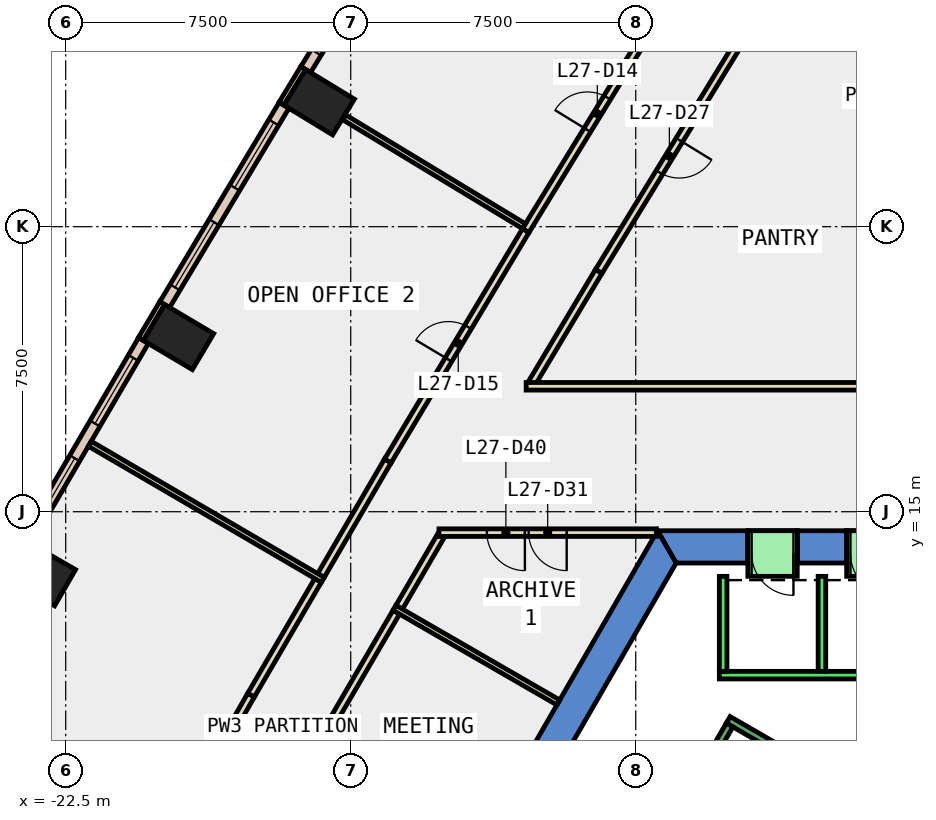
"""IFC4 building model, lengths in metres.
Left out: names, types, materials, properties, quantities, classifications, styles, units other than length and angle.
Written with IfcOpenShell. Run it as: python <this file> out.ifc"""

import sys

from ifc_helpers import new_model, si_unit, direction, frame, frame_2d, origin, origin_2d, place, context, subcontext, project, spatial, polyline, rectangle, outline, extrude, element, fill, save


model = new_model("IFC4")
c1 = context("Model", 3, precision=1e-05, world=origin(), true_north=direction((0.0, 1.0)))
c2 = subcontext(c1, "Body", "Model", "MODEL_VIEW")
j1 = project(units=[si_unit("LENGTHUNIT", "METRE"), si_unit("PLANEANGLEUNIT", "RADIAN")], contexts=[c1])
p1 = place(None, origin())
s1 = spatial("IfcSite", under=j1, at=p1, CompositionType="ELEMENT")
p2 = place(p1, origin())
s2 = spatial("IfcBuilding", under=s1, at=p2, CompositionType="ELEMENT")
p3 = place(p2, frame((0.0, 0.0, 124.4)))
s3 = spatial("IfcBuildingStorey", under=s2, at=p3, CompositionType="ELEMENT", Elevation=124.4)
for number, where, z_axis, x_axis in (
    (1, (-15.831, 25.776, -0.4), (0.0, 0.0, 1.0), (0.52, 0.854, 0.0)),
    (2, (-19.532, 19.595, -0.4), (0.0, 0.0, 1.0), (0.51, 0.86, 0.0)),
    (3, (-23.166, 13.375, -0.4), (0.0, 0.0, 1.0), (0.5, 0.866, 0.0)),
):
    element("IfcColumn", number, at=place(p3, frame(where, z_axis=z_axis, x_axis=x_axis)), inside=s3, PredefinedType="COLUMN", context=c2, shape_type="SweptSolid", body=[
        extrude(rectangle(XDim=1.1, YDim=1.5, at=origin_2d()), origin(), (0.0, 0.0, 1.0), 4.2),
    ])
p4 = place(p3, frame((0.0, 0.0, -0.4)))
e4 = element("IfcWall", 4, at=p4, inside=s3, PredefinedType="SHEAR", context=c2, shape_type="SweptSolid", body=[
    extrude(outline(polyline([(-3.25, 14.5), (-3.25, 13.65), (-1.95, 13.65), (-1.95, 14.5), (-3.25, 14.5)])), origin(), (0.0, 0.0, 1.0), 4.2),
])
p5 = place(p3, frame((0.0, 0.0, -0.4)))
e5 = element("IfcWall", 5, at=p5, inside=s3, PredefinedType="SHEAR", context=c2, shape_type="SweptSolid", body=[
    extrude(outline(polyline([(-4.55, 13.65), (-4.55, 14.5), (-6.928, 14.5), (-6.437, 13.65), (-4.55, 13.65)])), origin(), (0.0, 0.0, 1.0), 4.2),
])
p6 = place(p3, frame((0.0, 0.0, 3.6)))
e6 = element("IfcWall", 6, at=p6, inside=s3, PredefinedType="SHEAR", context=c2, shape_type="SweptSolid", body=[
    extrude(outline(polyline([(-1.95, 14.5), (-1.95, 13.65), (-0.65, 13.65), (-0.65, 14.5), (-1.95, 14.5)])), origin(), (0.0, 0.0, 1.0), 0.2),
])
p7 = place(p3, frame((0.0, 0.0, 3.6)))
e7 = element("IfcWall", 7, at=p7, inside=s3, PredefinedType="SHEAR", context=c2, shape_type="SweptSolid", body=[
    extrude(outline(polyline([(-4.55, 14.5), (-4.55, 13.65), (-3.25, 13.65), (-3.25, 14.5), (-4.55, 14.5)])), origin(), (0.0, 0.0, 1.0), 0.2),
])
p8 = place(p3, frame((0.0, 0.0, -0.4)))
e8 = element("IfcWall", 8, at=p8, inside=s3, PredefinedType="SHEAR", context=c2, shape_type="SweptSolid", body=[
    extrude(outline(polyline([(-12.267, 5.252), (-11.531, 4.827), (-6.437, 13.65), (-6.928, 14.5), (-12.267, 5.252)])), origin(), (0.0, 0.0, 1.0), 4.2),
])
p9 = place(p3, frame((-16.25, 26.675, 0.0), z_axis=(0.0, 0.0, 1.0), x_axis=(-0.519869515594, -0.854245682901, 0.0)))
e9 = element("IfcWall", 9, at=p9, inside=s3, PredefinedType="STANDARD", context=c2, shape_type="SweptSolid", body=[
    extrude(rectangle(XDim=1.1, YDim=0.15, at=frame_2d((0.55, 0.0))), origin(), (0.0, 0.0, 1.0), 3.8),
])
p10 = place(p3, frame((-19.961, 20.489, 0.0), z_axis=(0.0, 0.0, 1.0), x_axis=(-0.510082245696, -0.860125631885, 0.0)))
e10 = element("IfcWall", 10, at=p10, inside=s3, PredefinedType="STANDARD", context=c2, shape_type="SweptSolid", body=[
    extrude(rectangle(XDim=1.1, YDim=0.15, at=frame_2d((0.55, 0.0))), origin(), (0.0, 0.0, 1.0), 3.8),
])
p11 = place(p3, frame((-12.989, 31.846, 0.0), z_axis=(0.0, 0.0, 1.0), x_axis=(-0.522757750181, -0.8524812811, 0.0)))
e11 = element("IfcWall", 11, at=p11, inside=s3, PredefinedType="STANDARD", context=c2, shape_type="SweptSolid", body=[
    extrude(rectangle(XDim=6.114, YDim=0.3, at=frame_2d((3.057, 0.0))), origin(), (0.0, 0.0, 1.0), 3.8),
])
p12 = place(p11, frame((0.528, 0.0, 0.9)))
e12 = element("IfcOpeningElement", 12, at=p12, cuts=e11, PredefinedType="OPENING", context=c2, shape_type="SweptSolid", body=[
    extrude(rectangle(XDim=2.0, YDim=2.6, at=frame_2d((1.0, 1.3))), frame((0.0, 0.16, 0.0), z_axis=(0.0, -1.0, 0.0), x_axis=(1.0, 0.0, 0.0)), (0.0, 0.0, 1.0), 0.32),
])
p13 = place(p11, frame((3.585, 0.0, 0.9)))
e13 = element("IfcOpeningElement", 13, at=p13, cuts=e11, PredefinedType="OPENING", context=c2, shape_type="SweptSolid", body=[
    extrude(rectangle(XDim=2.0, YDim=2.6, at=frame_2d((1.0, 1.3))), frame((0.0, 0.16, 0.0), z_axis=(0.0, -1.0, 0.0), x_axis=(1.0, 0.0, 0.0)), (0.0, 0.0, 1.0), 0.32),
])
p14 = place(p3, frame((-16.754, 25.695, 0.0), z_axis=(0.0, 0.0, 1.0), x_axis=(-0.513708729904, -0.857964650099, 0.0)))
e14 = element("IfcWall", 14, at=p14, inside=s3, PredefinedType="STANDARD", context=c2, shape_type="SweptSolid", body=[
    extrude(rectangle(XDim=6.115, YDim=0.3, at=frame_2d((3.057, 0.0))), origin(), (0.0, 0.0, 1.0), 3.8),
])
p15 = place(p14, frame((0.529, 0.0, 0.9)))
e15 = element("IfcOpeningElement", 15, at=p15, cuts=e14, PredefinedType="OPENING", context=c2, shape_type="SweptSolid", body=[
    extrude(rectangle(XDim=2.0, YDim=2.6, at=frame_2d((1.0, 1.3))), frame((0.0, 0.16, 0.0), z_axis=(0.0, -1.0, 0.0), x_axis=(1.0, 0.0, 0.0)), (0.0, 0.0, 1.0), 0.32),
])
p16 = place(p14, frame((3.586, 0.0, 0.9)))
e16 = element("IfcOpeningElement", 16, at=p16, cuts=e14, PredefinedType="OPENING", context=c2, shape_type="SweptSolid", body=[
    extrude(rectangle(XDim=2.0, YDim=2.6, at=frame_2d((1.0, 1.3))), frame((0.0, 0.16, 0.0), z_axis=(0.0, -1.0, 0.0), x_axis=(1.0, 0.0, 0.0)), (0.0, 0.0, 1.0), 0.32),
])
p17 = place(p3, frame((-20.454, 19.503, 0.0), z_axis=(0.0, 0.0, 1.0), x_axis=(-0.504441987427, -0.863445586775, 0.0)))
e17 = element("IfcWall", 17, at=p17, inside=s3, PredefinedType="STANDARD", context=c2, shape_type="SweptSolid", body=[
    extrude(rectangle(XDim=6.114, YDim=0.3, at=frame_2d((3.057, 0.0))), origin(), (0.0, 0.0, 1.0), 3.8),
])
p18 = place(p17, frame((0.528, 0.0, 0.9)))
e18 = element("IfcOpeningElement", 18, at=p18, cuts=e17, PredefinedType="OPENING", context=c2, shape_type="SweptSolid", body=[
    extrude(rectangle(XDim=2.0, YDim=2.6, at=frame_2d((1.0, 1.3))), frame((0.0, 0.16, 0.0), z_axis=(0.0, -1.0, 0.0), x_axis=(1.0, 0.0, 0.0)), (0.0, 0.0, 1.0), 0.32),
])
p19 = place(p17, frame((3.585, 0.0, 0.9)))
e19 = element("IfcOpeningElement", 19, at=p19, cuts=e17, PredefinedType="OPENING", context=c2, shape_type="SweptSolid", body=[
    extrude(rectangle(XDim=2.0, YDim=2.6, at=frame_2d((1.0, 1.3))), frame((0.0, 0.16, 0.0), z_axis=(0.0, -1.0, 0.0), x_axis=(1.0, 0.0, 0.0)), (0.0, 0.0, 1.0), 0.32),
])
p20 = place(p3, frame((-12.628, 14.364, 0.0), z_axis=(0.0, 0.0, 1.0), x_axis=(-0.504457175129, -0.863436713639, 0.0)))
e20 = element("IfcWall", 20, at=p20, inside=s3, PredefinedType="PARTITIONING", context=c2, shape_type="SweptSolid", body=[
    extrude(rectangle(XDim=2.175, YDim=0.2, at=frame_2d((1.087, 0.0))), origin(), (0.0, 0.0, 1.0), 3.8),
])
p21 = place(p3, frame((-13.801, 12.356, 0.0), z_axis=(0.0, 0.0, 1.0), x_axis=(-0.504282474222, -0.863538757782, 0.0)))
e21 = element("IfcWall", 21, at=p21, inside=s3, PredefinedType="PARTITIONING", context=c2, shape_type="SweptSolid", body=[
    extrude(rectangle(XDim=3.8, YDim=0.2, at=frame_2d((1.9, 0.0))), origin(), (0.0, 0.0, 1.0), 3.8),
])
p22 = place(p3, frame((-15.717, 9.075, 0.0), z_axis=(0.0, 0.0, 1.0), x_axis=(-0.495695496657, -0.868496387208, 0.0)))
e22 = element("IfcWall", 22, at=p22, inside=s3, PredefinedType="PARTITIONING", context=c2, shape_type="SweptSolid", body=[
    extrude(rectangle(XDim=1.186, YDim=0.2, at=frame_2d((0.593, 0.0))), origin(), (0.0, 0.0, 1.0), 3.8),
])
p23 = place(p3, frame((-4.756, 27.386, 0.0), z_axis=(0.0, 0.0, 1.0), x_axis=(-0.522743103274, -0.852490262689, 0.0)))
e23 = element("IfcWall", 23, at=p23, inside=s3, PredefinedType="PARTITIONING", context=c2, shape_type="SweptSolid", body=[
    extrude(rectangle(XDim=7.115, YDim=0.2, at=frame_2d((3.557, 0.0))), origin(), (0.0, 0.0, 1.0), 3.8),
])
p24 = place(p23, frame((3.057, 0.0, 0.0)))
e24 = element("IfcOpeningElement", 24, at=p24, cuts=e23, PredefinedType="OPENING", context=c2, shape_type="SweptSolid", body=[
    extrude(rectangle(XDim=1.0, YDim=2.1, at=frame_2d((0.5, 1.05))), frame((0.0, 0.11, 0.0), z_axis=(0.0, -1.0, 0.0), x_axis=(1.0, 0.0, 0.0)), (0.0, 0.0, 1.0), 0.22),
])
p25 = place(p3, frame((-8.475, 21.321, 0.0), z_axis=(0.0, 0.0, 1.0), x_axis=(-0.513592824646, -0.858034038062, 0.0)))
e25 = element("IfcWall", 25, at=p25, inside=s3, PredefinedType="PARTITIONING", context=c2, shape_type="SweptSolid", body=[
    extrude(rectangle(XDim=3.421, YDim=0.2, at=frame_2d((1.71, 0.0))), origin(), (0.0, 0.0, 1.0), 3.8),
])
p26 = place(p3, frame((-10.396, 22.397, 0.0), z_axis=(0.0, 0.0, 1.0), x_axis=(0.522695398968, 0.852519512913, 0.0)))
e26 = element("IfcWall", 26, at=p26, inside=s3, PredefinedType="PARTITIONING", context=c2, shape_type="SweptSolid", body=[
    extrude(rectangle(XDim=7.213, YDim=0.2, at=frame_2d((3.606, 0.0))), origin(), (0.0, 0.0, 1.0), 3.8),
])
p27 = place(p26, frame((3.106, 0.0, 0.0)))
e27 = element("IfcOpeningElement", 27, at=p27, cuts=e26, PredefinedType="OPENING", context=c2, shape_type="SweptSolid", body=[
    extrude(rectangle(XDim=1.0, YDim=2.1, at=frame_2d((0.5, 1.05))), frame((0.0, 0.11, 0.0), z_axis=(0.0, -1.0, 0.0), x_axis=(1.0, 0.0, 0.0)), (0.0, 0.0, 1.0), 0.22),
])
p28 = place(p3, frame((-15.784, 13.322, 0.0), z_axis=(0.0, 0.0, 1.0), x_axis=(0.50424043703, 0.863563304954, 0.0)))
e28 = element("IfcWall", 28, at=p28, inside=s3, PredefinedType="PARTITIONING", context=c2, shape_type="SweptSolid", body=[
    extrude(rectangle(XDim=3.492, YDim=0.2, at=frame_2d((1.746, 0.0))), origin(), (0.0, 0.0, 1.0), 3.8),
])
p29 = place(p3, frame((-14.023, 16.338, 0.0), z_axis=(0.0, 0.0, 1.0), x_axis=(0.513773581048, 0.857925816966, 0.0)))
e29 = element("IfcWall", 29, at=p29, inside=s3, PredefinedType="PARTITIONING", context=c2, shape_type="SweptSolid", body=[
    extrude(rectangle(XDim=7.061, YDim=0.2, at=frame_2d((3.531, 0.0))), origin(), (0.0, 0.0, 1.0), 3.8),
])
p30 = place(p29, frame((3.106, 0.0, 0.0)))
e30 = element("IfcOpeningElement", 30, at=p30, cuts=e29, PredefinedType="OPENING", context=c2, shape_type="SweptSolid", body=[
    extrude(rectangle(XDim=1.0, YDim=2.1, at=frame_2d((0.5, 1.05))), frame((0.0, 0.11, 0.0), z_axis=(0.0, -1.0, 0.0), x_axis=(1.0, 0.0, 0.0)), (0.0, 0.0, 1.0), 0.22),
])
p31 = place(p3, frame((-21.16, 3.974, 0.0), z_axis=(0.0, 0.0, 1.0), x_axis=(0.495450054309, 0.868636427791, 0.0)))
e31 = element("IfcWall", 31, at=p31, inside=s3, PredefinedType="PARTITIONING", context=c2, shape_type="SweptSolid", body=[
    extrude(rectangle(XDim=7.139, YDim=0.2, at=frame_2d((3.569, 0.0))), origin(), (0.0, 0.0, 1.0), 3.8),
])
p32 = place(p31, frame((3.069, 0.0, 0.0)))
e32 = element("IfcOpeningElement", 32, at=p32, cuts=e31, PredefinedType="OPENING", context=c2, shape_type="SweptSolid", body=[
    extrude(rectangle(XDim=1.0, YDim=2.1, at=frame_2d((0.5, 1.05))), frame((0.0, 0.11, 0.0), z_axis=(0.0, -1.0, 0.0), x_axis=(1.0, 0.0, 0.0)), (0.0, 0.0, 1.0), 0.22),
])
p33 = place(p3, frame((-17.623, 10.175, 0.0), z_axis=(0.0, 0.0, 1.0), x_axis=(0.504383407959, 0.863479807393, 0.0)))
e33 = element("IfcWall", 33, at=p33, inside=s3, PredefinedType="PARTITIONING", context=c2, shape_type="SweptSolid", body=[
    extrude(rectangle(XDim=3.495, YDim=0.2, at=frame_2d((1.748, 0.0))), origin(), (0.0, 0.0, 1.0), 3.8),
])
p34 = place(p3, frame((-9.537, 9.981, 0.0), z_axis=(0.0, 0.0, 1.0), x_axis=(-0.866035377451, 0.499982724704, 0.0)))
e34 = element("IfcWall", 34, at=p34, inside=s3, PredefinedType="PARTITIONING", context=c2, shape_type="SweptSolid", body=[
    extrude(rectangle(XDim=4.98, YDim=0.15, at=frame_2d((2.49, 0.0))), origin(), (0.0, 0.0, 1.0), 3.8),
])
p35 = place(p3, frame((-6.957, 14.45, 0.0), z_axis=(0.0, 0.0, 1.0), x_axis=(-1.0, 0.0, 0.0)))
e35 = element("IfcWall", 35, at=p35, inside=s3, PredefinedType="PARTITIONING", context=c2, shape_type="SweptSolid", body=[
    extrude(rectangle(XDim=5.721, YDim=0.2, at=frame_2d((2.86, 0.0))), origin(), (0.0, 0.0, 1.0), 3.8),
])
p36 = place(p35, frame((2.36, 0.0, 0.0)))
e36 = element("IfcOpeningElement", 36, at=p36, cuts=e35, PredefinedType="OPENING", context=c2, shape_type="SweptSolid", body=[
    extrude(rectangle(XDim=1.0, YDim=2.1, at=frame_2d((0.5, 1.05))), frame((0.0, 0.11, 0.0), z_axis=(0.0, -1.0, 0.0), x_axis=(1.0, 0.0, 0.0)), (0.0, 0.0, 1.0), 0.22),
])
p37 = place(p35, frame((3.46, 0.0, 0.0)))
e37 = element("IfcOpeningElement", 37, at=p37, cuts=e35, PredefinedType="OPENING", context=c2, shape_type="SweptSolid", body=[
    extrude(rectangle(XDim=1.0, YDim=2.1, at=frame_2d((0.5, 1.05))), frame((0.0, 0.11, 0.0), z_axis=(0.0, -1.0, 0.0), x_axis=(1.0, 0.0, 0.0)), (0.0, 0.0, 1.0), 0.22),
])
p38 = place(p3, frame((-10.384, 18.3, 0.0), z_axis=(0.0, 0.0, 1.0), x_axis=(1.0, 0.0, 0.0)))
e38 = element("IfcWall", 38, at=p38, inside=s3, PredefinedType="PARTITIONING", context=c2, shape_type="SweptSolid", body=[
    extrude(rectangle(XDim=9.984, YDim=0.2, at=frame_2d((4.992, 0.0))), origin(), (0.0, 0.0, 1.0), 3.8),
])
p39 = place(p3, frame((-10.442, 22.513, 0.0), z_axis=(0.0, 0.0, 1.0), x_axis=(-0.855343076014, 0.518061986943, 0.0)))
e39 = element("IfcWall", 39, at=p39, inside=s3, PredefinedType="PARTITIONING", context=c2, shape_type="SweptSolid", body=[
    extrude(rectangle(XDim=5.53, YDim=0.15, at=frame_2d((2.765, 0.0))), origin(), (0.0, 0.0, 1.0), 3.8),
])
p40 = place(p3, frame((-15.736, 13.207, 0.0), z_axis=(0.0, 0.0, 1.0), x_axis=(-0.863454426155, 0.504426856892, 0.0)))
e40 = element("IfcWall", 40, at=p40, inside=s3, PredefinedType="PARTITIONING", context=c2, shape_type="SweptSolid", body=[
    extrude(rectangle(XDim=7.099, YDim=0.15, at=frame_2d((3.55, 0.0))), origin(), (0.0, 0.0, 1.0), 3.8),
])
p41 = place(p3, frame((5.3, 10.7, 0.0), z_axis=(0.0, 0.0, 1.0), x_axis=(-1.0, 0.0, 0.0)))
e41 = element("IfcWall", 41, at=p41, inside=s3, PredefinedType="STANDARD", context=c2, shape_type="SweptSolid", body=[
    extrude(rectangle(XDim=10.6, YDim=0.2, at=frame_2d((5.3, 0.0))), origin(), (0.0, 0.0, 1.0), 3.8),
])
for number, where, z_axis, x_axis in (
    (42, (-2.6, 10.8, 0.0), (0.0, 0.0, 1.0), (0.0, 1.0, 0.0)),
    (43, (-5.2, 10.8, 0.0), (0.0, 0.0, 1.0), (0.0, 1.0, 0.0)),
):
    element("IfcWall", number, at=place(p3, frame(where, z_axis=z_axis, x_axis=x_axis)), inside=s3, PredefinedType="STANDARD", context=c2, shape_type="SweptSolid", body=[
        extrude(rectangle(XDim=2.5, YDim=0.2, at=frame_2d((1.25, 0.0))), origin(), (0.0, 0.0, 1.0), 3.8),
    ])
p42 = place(p3, frame((-0.65, 13.9, 0.0), z_axis=(0.0, 0.0, 1.0), x_axis=(-1.0, 0.0, 0.0)))
e44 = element("IfcWall", 44, at=p42, inside=s3, PredefinedType="STANDARD", context=c2, shape_type="SweptSolid", body=[
    extrude(rectangle(XDim=1.3, YDim=1.2, at=frame_2d((0.65, 0.0))), origin(), (0.0, 0.0, 1.0), 2.4),
])
p43 = place(p42, frame((0.1, 0.0, 0.0)))
e45 = element("IfcOpeningElement", 45, at=p43, cuts=e44, PredefinedType="OPENING", context=c2, shape_type="SweptSolid", body=[
    extrude(rectangle(XDim=1.1, YDim=2.3, at=frame_2d((0.55, 1.15))), frame((0.0, 0.61, 0.0), z_axis=(0.0, -1.0, 0.0), x_axis=(1.0, 0.0, 0.0)), (0.0, 0.0, 1.0), 1.22),
])
p44 = place(p3, frame((-3.25, 13.9, 0.0), z_axis=(0.0, 0.0, 1.0), x_axis=(-1.0, 0.0, 0.0)))
e46 = element("IfcWall", 46, at=p44, inside=s3, PredefinedType="STANDARD", context=c2, shape_type="SweptSolid", body=[
    extrude(rectangle(XDim=1.3, YDim=1.2, at=frame_2d((0.65, 0.0))), origin(), (0.0, 0.0, 1.0), 2.4),
])
p45 = place(p44, frame((0.1, 0.0, 0.0)))
e47 = element("IfcOpeningElement", 47, at=p45, cuts=e46, PredefinedType="OPENING", context=c2, shape_type="SweptSolid", body=[
    extrude(rectangle(XDim=1.1, YDim=2.3, at=frame_2d((0.55, 1.15))), frame((0.0, 0.61, 0.0), z_axis=(0.0, -1.0, 0.0), x_axis=(1.0, 0.0, 0.0)), (0.0, 0.0, 1.0), 1.22),
])
p46 = place(p3, frame((-1.256, 7.324, 0.0), z_axis=(0.0, 0.0, 1.0), x_axis=(-0.866046073146, 0.499964197906, 0.0)))
e48 = element("IfcWall", 48, at=p46, inside=s3, PredefinedType="STANDARD", context=c2, shape_type="SweptSolid", body=[
    extrude(rectangle(XDim=4.4, YDim=0.2, at=frame_2d((2.2, 0.0))), origin(), (0.0, 0.0, 1.0), 3.8),
])
p47 = place(p46, frame((1.65, 0.0, 0.0)))
e49 = element("IfcOpeningElement", 49, at=p47, cuts=e48, PredefinedType="OPENING", context=c2, shape_type="SweptSolid", body=[
    extrude(rectangle(XDim=1.1, YDim=2.2, at=frame_2d((0.55, 1.1))), frame((0.0, 0.11, 0.0), z_axis=(0.0, -1.0, 0.0), x_axis=(1.0, 0.0, 0.0)), (0.0, 0.0, 1.0), 0.22),
])
p48 = place(p3, frame((-5.03, 9.388, 0.0), z_axis=(0.0, 0.0, 1.0), x_axis=(-0.499978703459, -0.866037698999, 0.0)))
e50 = element("IfcWall", 50, at=p48, inside=s3, PredefinedType="STANDARD", context=c2, shape_type="SweptSolid", body=[
    extrude(rectangle(XDim=6.9, YDim=0.2, at=frame_2d((3.45, 0.0))), origin(), (0.0, 0.0, 1.0), 3.8),
])
p49 = place(p13, origin())
e51 = element("IfcWindow", 51, at=p49, inside=s3, PartitioningType="SINGLE_PANEL", PredefinedType="WINDOW", context=c2, shape_type="SweptSolid", body=[
    extrude(rectangle(XDim=2.0, YDim=2.6, at=frame_2d((1.0, 1.3))), frame((0.0, 0.03, 0.0), z_axis=(0.0, -1.0, 0.0), x_axis=(1.0, 0.0, 0.0)), (0.0, 0.0, 1.0), 0.06),
])
fill(e13, e51)
p50 = place(p15, origin())
e52 = element("IfcWindow", 52, at=p50, inside=s3, PartitioningType="SINGLE_PANEL", PredefinedType="WINDOW", context=c2, shape_type="SweptSolid", body=[
    extrude(rectangle(XDim=2.0, YDim=2.6, at=frame_2d((1.0, 1.3))), frame((0.0, 0.03, 0.0), z_axis=(0.0, -1.0, 0.0), x_axis=(1.0, 0.0, 0.0)), (0.0, 0.0, 1.0), 0.06),
])
fill(e15, e52)
p51 = place(p16, origin())
e53 = element("IfcWindow", 53, at=p51, inside=s3, PartitioningType="SINGLE_PANEL", PredefinedType="WINDOW", context=c2, shape_type="SweptSolid", body=[
    extrude(rectangle(XDim=2.0, YDim=2.6, at=frame_2d((1.0, 1.3))), frame((0.0, 0.03, 0.0), z_axis=(0.0, -1.0, 0.0), x_axis=(1.0, 0.0, 0.0)), (0.0, 0.0, 1.0), 0.06),
])
fill(e16, e53)
p52 = place(p18, origin())
e54 = element("IfcWindow", 54, at=p52, inside=s3, PartitioningType="SINGLE_PANEL", PredefinedType="WINDOW", context=c2, shape_type="SweptSolid", body=[
    extrude(rectangle(XDim=2.0, YDim=2.6, at=frame_2d((1.0, 1.3))), frame((0.0, 0.03, 0.0), z_axis=(0.0, -1.0, 0.0), x_axis=(1.0, 0.0, 0.0)), (0.0, 0.0, 1.0), 0.06),
])
fill(e18, e54)
p53 = place(p19, origin())
e55 = element("IfcWindow", 55, at=p53, inside=s3, PartitioningType="SINGLE_PANEL", PredefinedType="WINDOW", context=c2, shape_type="SweptSolid", body=[
    extrude(rectangle(XDim=2.0, YDim=2.6, at=frame_2d((1.0, 1.3))), frame((0.0, 0.03, 0.0), z_axis=(0.0, -1.0, 0.0), x_axis=(1.0, 0.0, 0.0)), (0.0, 0.0, 1.0), 0.06),
])
fill(e19, e55)
p54 = place(p27, origin())
e56 = element("IfcDoor", 56, at=p54, inside=s3, OperationType="SINGLE_SWING_LEFT", PredefinedType="DOOR", context=c2, shape_type="SweptSolid", body=[
    extrude(rectangle(XDim=1.0, YDim=2.1, at=frame_2d((0.5, 1.05))), frame((0.0, 0.025, 0.0), z_axis=(0.0, -1.0, 0.0), x_axis=(1.0, 0.0, 0.0)), (0.0, 0.0, 1.0), 0.05),
])
fill(e27, e56)
p55 = place(p30, origin())
e57 = element("IfcDoor", 57, at=p55, inside=s3, OperationType="SINGLE_SWING_LEFT", PredefinedType="DOOR", context=c2, shape_type="SweptSolid", body=[
    extrude(rectangle(XDim=1.0, YDim=2.1, at=frame_2d((0.5, 1.05))), frame((0.0, 0.025, 0.0), z_axis=(0.0, -1.0, 0.0), x_axis=(1.0, 0.0, 0.0)), (0.0, 0.0, 1.0), 0.05),
])
fill(e30, e57)
p56 = place(p24, origin())
e58 = element("IfcDoor", 58, at=p56, inside=s3, OperationType="SINGLE_SWING_RIGHT", PredefinedType="DOOR", context=c2, shape_type="SweptSolid", body=[
    extrude(rectangle(XDim=1.0, YDim=2.1, at=frame_2d((0.5, 1.05))), frame((0.0, 0.025, 0.0), z_axis=(0.0, -1.0, 0.0), x_axis=(1.0, 0.0, 0.0)), (0.0, 0.0, 1.0), 0.05),
])
fill(e24, e58)
p57 = place(p36, origin())
e59 = element("IfcDoor", 59, at=p57, inside=s3, OperationType="SINGLE_SWING_LEFT", PredefinedType="DOOR", context=c2, shape_type="SweptSolid", body=[
    extrude(rectangle(XDim=1.0, YDim=2.1, at=frame_2d((0.5, 1.05))), frame((0.0, 0.025, 0.0), z_axis=(0.0, -1.0, 0.0), x_axis=(1.0, 0.0, 0.0)), (0.0, 0.0, 1.0), 0.05),
])
fill(e36, e59)
p58 = place(p37, origin())
e60 = element("IfcDoor", 60, at=p58, inside=s3, OperationType="SINGLE_SWING_RIGHT", PredefinedType="DOOR", context=c2, shape_type="SweptSolid", body=[
    extrude(rectangle(XDim=1.0, YDim=2.1, at=frame_2d((0.5, 1.05))), frame((0.0, 0.025, 0.0), z_axis=(0.0, -1.0, 0.0), x_axis=(1.0, 0.0, 0.0)), (0.0, 0.0, 1.0), 0.05),
])
fill(e37, e60)
p59 = place(p43, origin())
e61 = element("IfcDoor", 61, at=p59, inside=s3, OperationType="SLIDING_TO_LEFT", PredefinedType="DOOR", context=c2, shape_type="SweptSolid", body=[
    extrude(rectangle(XDim=1.1, YDim=2.3, at=frame_2d((0.55, 1.15))), frame((0.0, 0.025, 0.0), z_axis=(0.0, -1.0, 0.0), x_axis=(1.0, 0.0, 0.0)), (0.0, 0.0, 1.0), 0.05),
])
fill(e45, e61)
p60 = place(p45, origin())
e62 = element("IfcDoor", 62, at=p60, inside=s3, OperationType="SLIDING_TO_LEFT", PredefinedType="DOOR", context=c2, shape_type="SweptSolid", body=[
    extrude(rectangle(XDim=1.1, YDim=2.3, at=frame_2d((0.55, 1.15))), frame((0.0, 0.025, 0.0), z_axis=(0.0, -1.0, 0.0), x_axis=(1.0, 0.0, 0.0)), (0.0, 0.0, 1.0), 0.05),
])
fill(e47, e62)
save(model, sys.argv[1])
